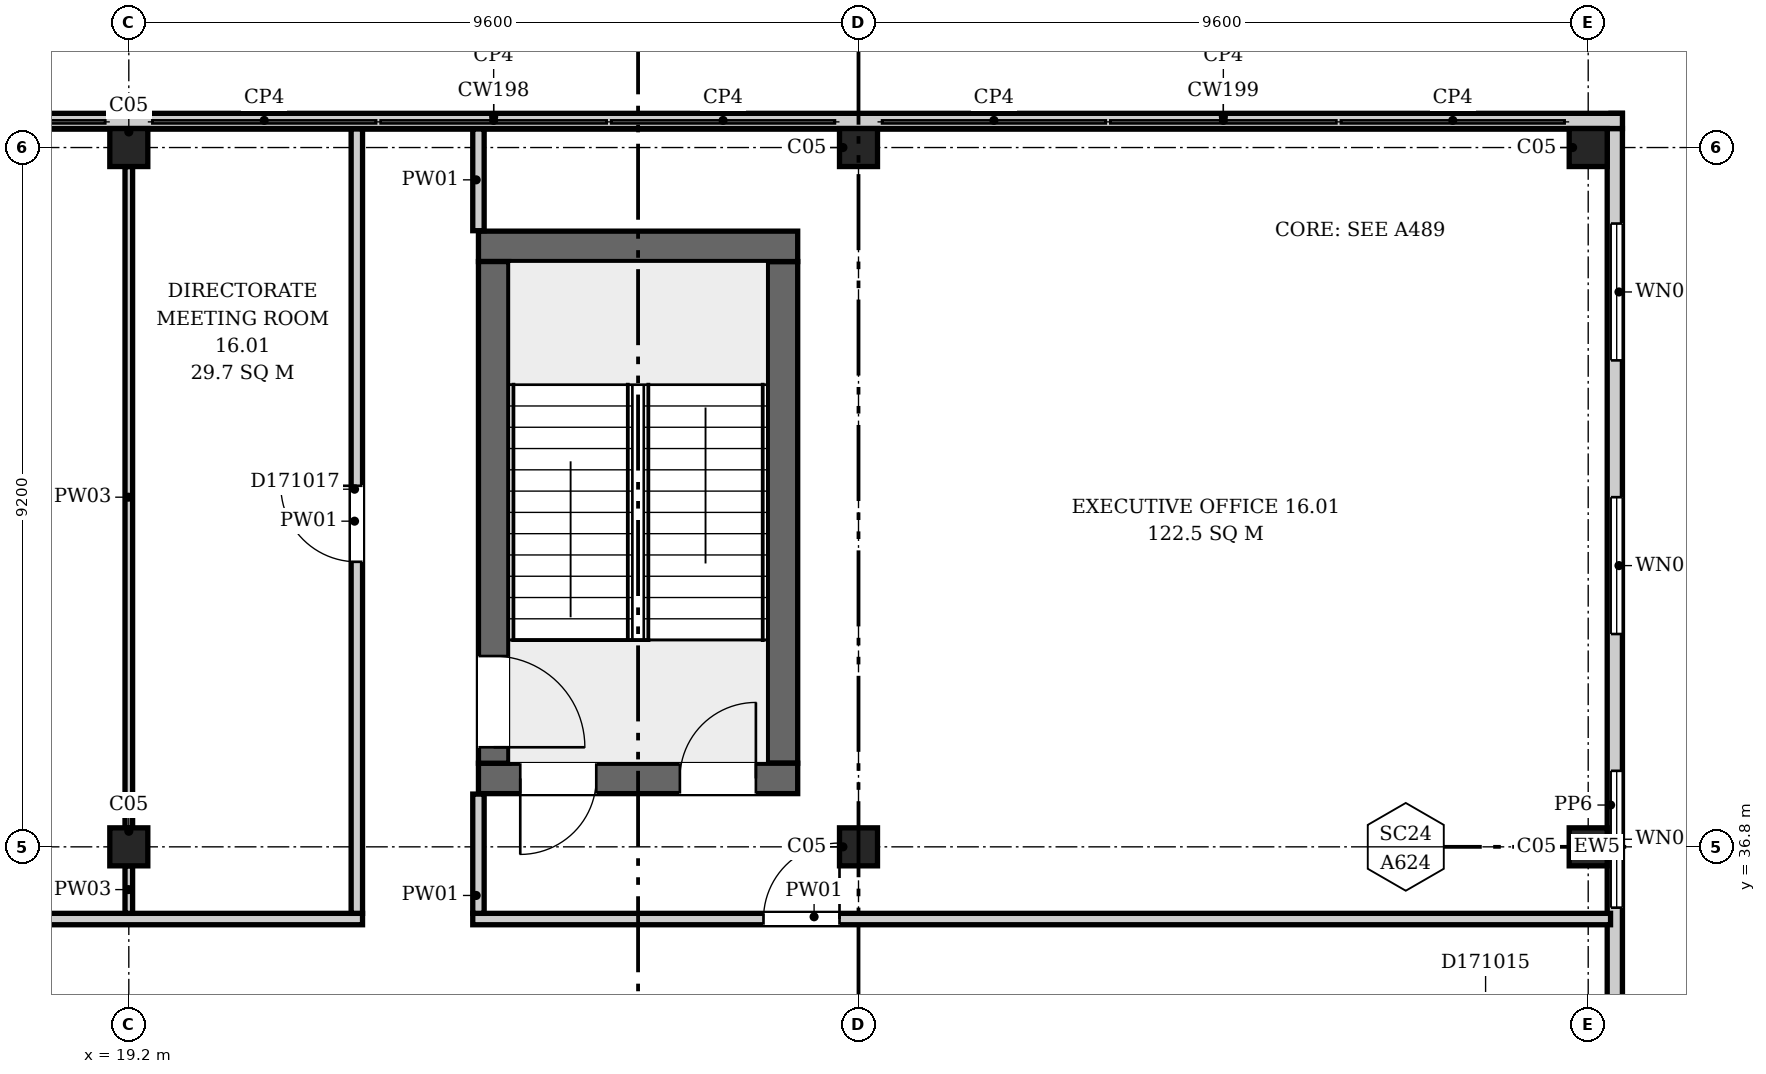
"""IFC4 building model, lengths in metres.
Left out: names, types, materials, properties, quantities, classifications, styles, units other than length and angle.
Written with IfcOpenShell. Run it as: python <this file> out.ifc"""

import sys

from ifc_helpers import new_model, si_unit, direction, frame, frame_2d, origin, origin_2d, place, context, subcontext, project, spatial, rectangle, extrude, element, fill, save


model = new_model("IFC4")
c1 = context("Model", 3, precision=1e-05, world=origin(), true_north=direction((0.0, 1.0)))
c2 = subcontext(c1, "Body", "Model", "MODEL_VIEW")
j1 = project(units=[si_unit("LENGTHUNIT", "METRE"), si_unit("PLANEANGLEUNIT", "RADIAN")], contexts=[c1])
p1 = place(None, origin())
s1 = spatial("IfcSite", under=j1, at=p1, CompositionType="ELEMENT")
p2 = place(p1, origin())
s2 = spatial("IfcBuilding", under=s1, at=p2, CompositionType="ELEMENT")
p3 = place(p2, frame((0.0, 0.0, 78.1)))
s3 = spatial("IfcBuildingStorey", under=s2, at=p3, CompositionType="ELEMENT", Elevation=78.1)
p4 = place(p3, frame((23.8, 37.7, 0.0), z_axis=(0.0, 0.0, 1.0), x_axis=(1.0, 0.0, 0.0)))
e1 = element("IfcWall", 1, at=p4, inside=s3, PredefinedType="SHEAR", context=c2, shape_type="SweptSolid", body=[
    extrude(rectangle(XDim=4.2, YDim=0.4, at=frame_2d((2.1, 0.0))), origin(), (0.0, 0.0, 1.0), 7.1),
])
p5 = place(p4, frame((0.55, 0.0, 4.2)))
e2 = element("IfcOpeningElement", 2, at=p5, cuts=e1, PredefinedType="OPENING", context=c2, shape_type="SweptSolid", body=[
    extrude(rectangle(XDim=1.0, YDim=2.1, at=frame_2d((0.5, 1.05))), frame((0.0, 0.21, 0.0), z_axis=(0.0, -1.0, 0.0), x_axis=(1.0, 0.0, 0.0)), (0.0, 0.0, 1.0), 0.42),
])
p6 = place(p4, frame((2.65, 0.0, 4.2)))
e3 = element("IfcOpeningElement", 3, at=p6, cuts=e1, PredefinedType="OPENING", context=c2, shape_type="SweptSolid", body=[
    extrude(rectangle(XDim=1.0, YDim=2.1, at=frame_2d((0.5, 1.05))), frame((0.0, 0.21, 0.0), z_axis=(0.0, -1.0, 0.0), x_axis=(1.0, 0.0, 0.0)), (0.0, 0.0, 1.0), 0.42),
])
p7 = place(p3, frame((23.8, 44.7, 0.0), z_axis=(0.0, 0.0, 1.0), x_axis=(1.0, 0.0, 0.0)))
e4 = element("IfcWall", 4, at=p7, inside=s3, PredefinedType="SHEAR", context=c2, shape_type="SweptSolid", body=[
    extrude(rectangle(XDim=4.2, YDim=0.4, at=frame_2d((2.1, 0.0))), origin(), (0.0, 0.0, 1.0), 7.1),
])
p8 = place(p3, frame((24.0, 37.9, 0.0), z_axis=(0.0, 0.0, 1.0), x_axis=(0.0, 1.0, 0.0)))
e5 = element("IfcWall", 5, at=p8, inside=s3, PredefinedType="SHEAR", context=c2, shape_type="SweptSolid", body=[
    extrude(rectangle(XDim=6.6, YDim=0.4, at=frame_2d((3.3, 0.0))), origin(), (0.0, 0.0, 1.0), 7.1),
])
p9 = place(p8, frame((0.21, 0.0, 0.0)))
e6 = element("IfcOpeningElement", 6, at=p9, cuts=e5, PredefinedType="OPENING", context=c2, shape_type="SweptSolid", body=[
    extrude(rectangle(XDim=1.2, YDim=2.1, at=frame_2d((0.6, 1.05))), frame((0.0, 0.21, 0.0), z_axis=(0.0, -1.0, 0.0), x_axis=(1.0, 0.0, 0.0)), (0.0, 0.0, 1.0), 0.42),
])
p10 = place(p3, frame((27.8, 37.9, 0.0), z_axis=(0.0, 0.0, 1.0), x_axis=(0.0, 1.0, 0.0)))
e7 = element("IfcWall", 7, at=p10, inside=s3, PredefinedType="SHEAR", context=c2, shape_type="SweptSolid", body=[
    extrude(rectangle(XDim=6.6, YDim=0.4, at=frame_2d((3.3, 0.0))), origin(), (0.0, 0.0, 1.0), 7.1),
])
for number, where, z_axis, x_axis in (
    (8, (19.2, 36.8, 0.0), (0.0, 0.0, 1.0), (1.0, 0.0, 0.0)),
    (9, (28.8, 36.8, 0.0), (0.0, 0.0, 1.0), (1.0, 0.0, 0.0)),
    (10, (38.4, 36.8, 0.0), (0.0, 0.0, 1.0), (1.0, 0.0, 0.0)),
    (11, (19.2, 46.0, 0.0), (0.0, 0.0, 1.0), (1.0, 0.0, 0.0)),
    (12, (28.8, 46.0, 0.0), (0.0, 0.0, 1.0), (1.0, 0.0, 0.0)),
    (13, (38.4, 46.0, 0.0), (0.0, 0.0, 1.0), (1.0, 0.0, 0.0)),
):
    element("IfcColumn", number, at=place(p3, frame(where, z_axis=z_axis, x_axis=x_axis)), inside=s3, PredefinedType="COLUMN", context=c2, shape_type="SweptSolid", body=[
        extrude(rectangle(XDim=0.5, YDim=0.5, at=origin_2d()), origin(), (0.0, 0.0, 1.0), 3.9),
    ])
p11 = place(p3, frame((38.775, 27.15, 0.0), z_axis=(0.0, 0.0, 1.0), x_axis=(0.0, 1.0, 0.0)))
e14 = element("IfcWall", 14, at=p11, inside=s3, PredefinedType="ELEMENTEDWALL", context=c2, shape_type="SweptSolid", body=[
    extrude(rectangle(XDim=19.3, YDim=0.15, at=frame_2d((9.65, 0.0))), origin(), (0.0, 0.0, 1.0), 3.9),
])
p12 = place(p11, frame((1.65, 0.0, 0.9)))
e15 = element("IfcOpeningElement", 15, at=p12, cuts=e14, PredefinedType="OPENING", context=c2, shape_type="SweptSolid", body=[
    extrude(rectangle(XDim=1.8, YDim=2.6, at=frame_2d((0.9, 1.3))), frame((0.0, 0.085, 0.0), z_axis=(0.0, -1.0, 0.0), x_axis=(1.0, 0.0, 0.0)), (0.0, 0.0, 1.0), 0.17),
])
p13 = place(p11, frame((5.25, 0.0, 0.9)))
e16 = element("IfcOpeningElement", 16, at=p13, cuts=e14, PredefinedType="OPENING", context=c2, shape_type="SweptSolid", body=[
    extrude(rectangle(XDim=1.8, YDim=2.6, at=frame_2d((0.9, 1.3))), frame((0.0, 0.085, 0.0), z_axis=(0.0, -1.0, 0.0), x_axis=(1.0, 0.0, 0.0)), (0.0, 0.0, 1.0), 0.17),
])
p14 = place(p11, frame((8.85, 0.0, 0.9)))
e17 = element("IfcOpeningElement", 17, at=p14, cuts=e14, PredefinedType="OPENING", context=c2, shape_type="SweptSolid", body=[
    extrude(rectangle(XDim=1.8, YDim=2.6, at=frame_2d((0.9, 1.3))), frame((0.0, 0.085, 0.0), z_axis=(0.0, -1.0, 0.0), x_axis=(1.0, 0.0, 0.0)), (0.0, 0.0, 1.0), 0.17),
])
p15 = place(p11, frame((12.45, 0.0, 0.9)))
e18 = element("IfcOpeningElement", 18, at=p15, cuts=e14, PredefinedType="OPENING", context=c2, shape_type="SweptSolid", body=[
    extrude(rectangle(XDim=1.8, YDim=2.6, at=frame_2d((0.9, 1.3))), frame((0.0, 0.085, 0.0), z_axis=(0.0, -1.0, 0.0), x_axis=(1.0, 0.0, 0.0)), (0.0, 0.0, 1.0), 0.17),
])
p16 = place(p11, frame((16.05, 0.0, 0.9)))
e19 = element("IfcOpeningElement", 19, at=p16, cuts=e14, PredefinedType="OPENING", context=c2, shape_type="SweptSolid", body=[
    extrude(rectangle(XDim=1.8, YDim=2.6, at=frame_2d((0.9, 1.3))), frame((0.0, 0.085, 0.0), z_axis=(0.0, -1.0, 0.0), x_axis=(1.0, 0.0, 0.0)), (0.0, 0.0, 1.0), 0.17),
])
p17 = place(p3, frame((38.851, 46.35, 4.2), z_axis=(0.0, 0.0, 1.0), x_axis=(-1.0, 0.0, 0.0)))
e20 = element("IfcWall", 20, at=p17, inside=s3, PredefinedType="PARAPET", context=c2, shape_type="SweptSolid", body=[
    extrude(rectangle(XDim=39.05, YDim=0.2, at=frame_2d((19.525, 0.0))), origin(), (0.0, 0.0, 1.0), 1.1),
])
p18 = place(p3, frame((38.75, 27.35, 4.2), z_axis=(0.0, 0.0, 1.0), x_axis=(0.0, 1.0, 0.0)))
e21 = element("IfcWall", 21, at=p18, inside=s3, PredefinedType="PARAPET", context=c2, shape_type="SweptSolid", body=[
    extrude(rectangle(XDim=18.9, YDim=0.2, at=frame_2d((9.45, 0.0))), origin(), (0.0, 0.0, 1.0), 1.1),
])
p19 = place(p3, frame((11.225, 35.85, 0.0), z_axis=(0.0, 0.0, 1.0), x_axis=(1.0, 0.0, 0.0)))
e22 = element("IfcWall", 22, at=p19, inside=s3, PredefinedType="PARTITIONING", context=c2, shape_type="SweptSolid", body=[
    extrude(rectangle(XDim=11.05, YDim=0.15, at=frame_2d((5.525, 0.0))), origin(), (0.0, 0.0, 1.0), 3.9),
])
p20 = place(p3, frame((19.2, 35.925, 0.0), z_axis=(0.0, 0.0, 1.0), x_axis=(0.0, 1.0, 0.0)))
e23 = element("IfcWall", 23, at=p20, inside=s3, PredefinedType="PARTITIONING", context=c2, shape_type="SweptSolid", body=[
    extrude(rectangle(XDim=0.625, YDim=0.1, at=frame_2d((0.312, 0.0))), origin(), (0.0, 0.0, 1.0), 3.9),
])
p21 = place(p3, frame((19.2, 37.05, 0.0), z_axis=(0.0, 0.0, 1.0), x_axis=(0.0, 1.0, 0.0)))
e24 = element("IfcWall", 24, at=p21, inside=s3, PredefinedType="PARTITIONING", context=c2, shape_type="SweptSolid", body=[
    extrude(rectangle(XDim=8.7, YDim=0.1, at=frame_2d((4.35, 0.0))), origin(), (0.0, 0.0, 1.0), 3.9),
])
p22 = place(p3, frame((22.2, 35.925, 0.0), z_axis=(0.0, 0.0, 1.0), x_axis=(0.0, 1.0, 0.0)))
e25 = element("IfcWall", 25, at=p22, inside=s3, PredefinedType="PARTITIONING", context=c2, shape_type="SweptSolid", body=[
    extrude(rectangle(XDim=10.319, YDim=0.15, at=frame_2d((5.159, 0.0))), origin(), (0.0, 0.0, 1.0), 3.9),
])
p23 = place(p22, frame((4.625, 0.0, 0.0)))
e26 = element("IfcOpeningElement", 26, at=p23, cuts=e25, PredefinedType="OPENING", context=c2, shape_type="SweptSolid", body=[
    extrude(rectangle(XDim=1.0, YDim=2.1, at=frame_2d((0.5, 1.05))), frame((0.0, 0.085, 0.0), z_axis=(0.0, -1.0, 0.0), x_axis=(1.0, 0.0, 0.0)), (0.0, 0.0, 1.0), 0.17),
])
p24 = place(p3, frame((23.725, 35.85, 0.0), z_axis=(0.0, 0.0, 1.0), x_axis=(1.0, 0.0, 0.0)))
e27 = element("IfcWall", 27, at=p24, inside=s3, PredefinedType="PARTITIONING", context=c2, shape_type="SweptSolid", body=[
    extrude(rectangle(XDim=14.969, YDim=0.15, at=frame_2d((7.484, 0.0))), origin(), (0.0, 0.0, 1.0), 3.9),
])
p25 = place(p24, frame((3.825, 0.0, 0.0)))
e28 = element("IfcOpeningElement", 28, at=p25, cuts=e27, PredefinedType="OPENING", context=c2, shape_type="SweptSolid", body=[
    extrude(rectangle(XDim=1.0, YDim=2.1, at=frame_2d((0.5, 1.05))), frame((0.0, 0.085, 0.0), z_axis=(0.0, -1.0, 0.0), x_axis=(1.0, 0.0, 0.0)), (0.0, 0.0, 1.0), 0.17),
])
p26 = place(p3, frame((23.8, 35.925, 0.0), z_axis=(0.0, 0.0, 1.0), x_axis=(0.0, 1.0, 0.0)))
e29 = element("IfcWall", 29, at=p26, inside=s3, PredefinedType="PARTITIONING", context=c2, shape_type="SweptSolid", body=[
    extrude(rectangle(XDim=1.569, YDim=0.15, at=frame_2d((0.784, 0.0))), origin(), (0.0, 0.0, 1.0), 3.9),
])
p27 = place(p3, frame((23.8, 44.906, 0.0), z_axis=(0.0, 0.0, 1.0), x_axis=(0.0, 1.0, 0.0)))
e30 = element("IfcWall", 30, at=p27, inside=s3, PredefinedType="PARTITIONING", context=c2, shape_type="SweptSolid", body=[
    extrude(rectangle(XDim=1.338, YDim=0.15, at=frame_2d((0.669, 0.0))), origin(), (0.0, 0.0, 1.0), 3.9),
])
p28 = place(p14, origin())
e31 = element("IfcWindow", 31, at=p28, inside=s3, PartitioningType="SINGLE_PANEL", PredefinedType="WINDOW", context=c2, shape_type="SweptSolid", body=[
    extrude(rectangle(XDim=1.8, YDim=2.6, at=frame_2d((0.9, 1.3))), frame((0.0, 0.03, 0.0), z_axis=(0.0, -1.0, 0.0), x_axis=(1.0, 0.0, 0.0)), (0.0, 0.0, 1.0), 0.06),
])
fill(e17, e31)
p29 = place(p15, origin())
e32 = element("IfcWindow", 32, at=p29, inside=s3, PartitioningType="SINGLE_PANEL", PredefinedType="WINDOW", context=c2, shape_type="SweptSolid", body=[
    extrude(rectangle(XDim=1.8, YDim=2.6, at=frame_2d((0.9, 1.3))), frame((0.0, 0.03, 0.0), z_axis=(0.0, -1.0, 0.0), x_axis=(1.0, 0.0, 0.0)), (0.0, 0.0, 1.0), 0.06),
])
fill(e18, e32)
p30 = place(p16, origin())
e33 = element("IfcWindow", 33, at=p30, inside=s3, PartitioningType="SINGLE_PANEL", PredefinedType="WINDOW", context=c2, shape_type="SweptSolid", body=[
    extrude(rectangle(XDim=1.8, YDim=2.6, at=frame_2d((0.9, 1.3))), frame((0.0, 0.03, 0.0), z_axis=(0.0, -1.0, 0.0), x_axis=(1.0, 0.0, 0.0)), (0.0, 0.0, 1.0), 0.06),
])
fill(e19, e33)
p31 = place(p9, origin())
e34 = element("IfcDoor", 34, at=p31, inside=s3, OperationType="SINGLE_SWING_LEFT", PredefinedType="DOOR", context=c2, shape_type="SweptSolid", body=[
    extrude(rectangle(XDim=1.2, YDim=2.1, at=frame_2d((0.6, 1.05))), frame((0.0, 0.025, 0.0), z_axis=(0.0, -1.0, 0.0), x_axis=(1.0, 0.0, 0.0)), (0.0, 0.0, 1.0), 0.05),
])
fill(e6, e34)
p32 = place(p5, frame((1.0, 0.0, 0.0), z_axis=(0.0, 0.0, 1.0), x_axis=(-1.0, 0.0, 0.0)))
e35 = element("IfcDoor", 35, at=p32, inside=s3, OperationType="SINGLE_SWING_LEFT", PredefinedType="DOOR", context=c2, shape_type="SweptSolid", body=[
    extrude(rectangle(XDim=1.0, YDim=2.1, at=frame_2d((0.5, 1.05))), frame((0.0, 0.025, 0.0), z_axis=(0.0, -1.0, 0.0), x_axis=(1.0, 0.0, 0.0)), (0.0, 0.0, 1.0), 0.05),
])
fill(e2, e35)
p33 = place(p6, frame((1.0, 0.0, 0.0), z_axis=(0.0, 0.0, 1.0), x_axis=(-1.0, 0.0, 0.0)))
e36 = element("IfcDoor", 36, at=p33, inside=s3, OperationType="SINGLE_SWING_RIGHT", PredefinedType="DOOR", context=c2, shape_type="SweptSolid", body=[
    extrude(rectangle(XDim=1.0, YDim=2.1, at=frame_2d((0.5, 1.05))), frame((0.0, 0.025, 0.0), z_axis=(0.0, -1.0, 0.0), x_axis=(1.0, 0.0, 0.0)), (0.0, 0.0, 1.0), 0.05),
])
fill(e3, e36)
p34 = place(p23, origin())
e37 = element("IfcDoor", 37, at=p34, inside=s3, OperationType="SINGLE_SWING_RIGHT", PredefinedType="DOOR", context=c2, shape_type="SweptSolid", body=[
    extrude(rectangle(XDim=1.0, YDim=2.1, at=frame_2d((0.5, 1.05))), frame((0.0, 0.025, 0.0), z_axis=(0.0, -1.0, 0.0), x_axis=(1.0, 0.0, 0.0)), (0.0, 0.0, 1.0), 0.05),
])
fill(e26, e37)
p35 = place(p25, origin())
e38 = element("IfcDoor", 38, at=p35, inside=s3, OperationType="SINGLE_SWING_RIGHT", PredefinedType="DOOR", context=c2, shape_type="SweptSolid", body=[
    extrude(rectangle(XDim=1.0, YDim=2.1, at=frame_2d((0.5, 1.05))), frame((0.0, 0.025, 0.0), z_axis=(0.0, -1.0, 0.0), x_axis=(1.0, 0.0, 0.0)), (0.0, 0.0, 1.0), 0.05),
])
fill(e28, e38)
save(model, sys.argv[1])
